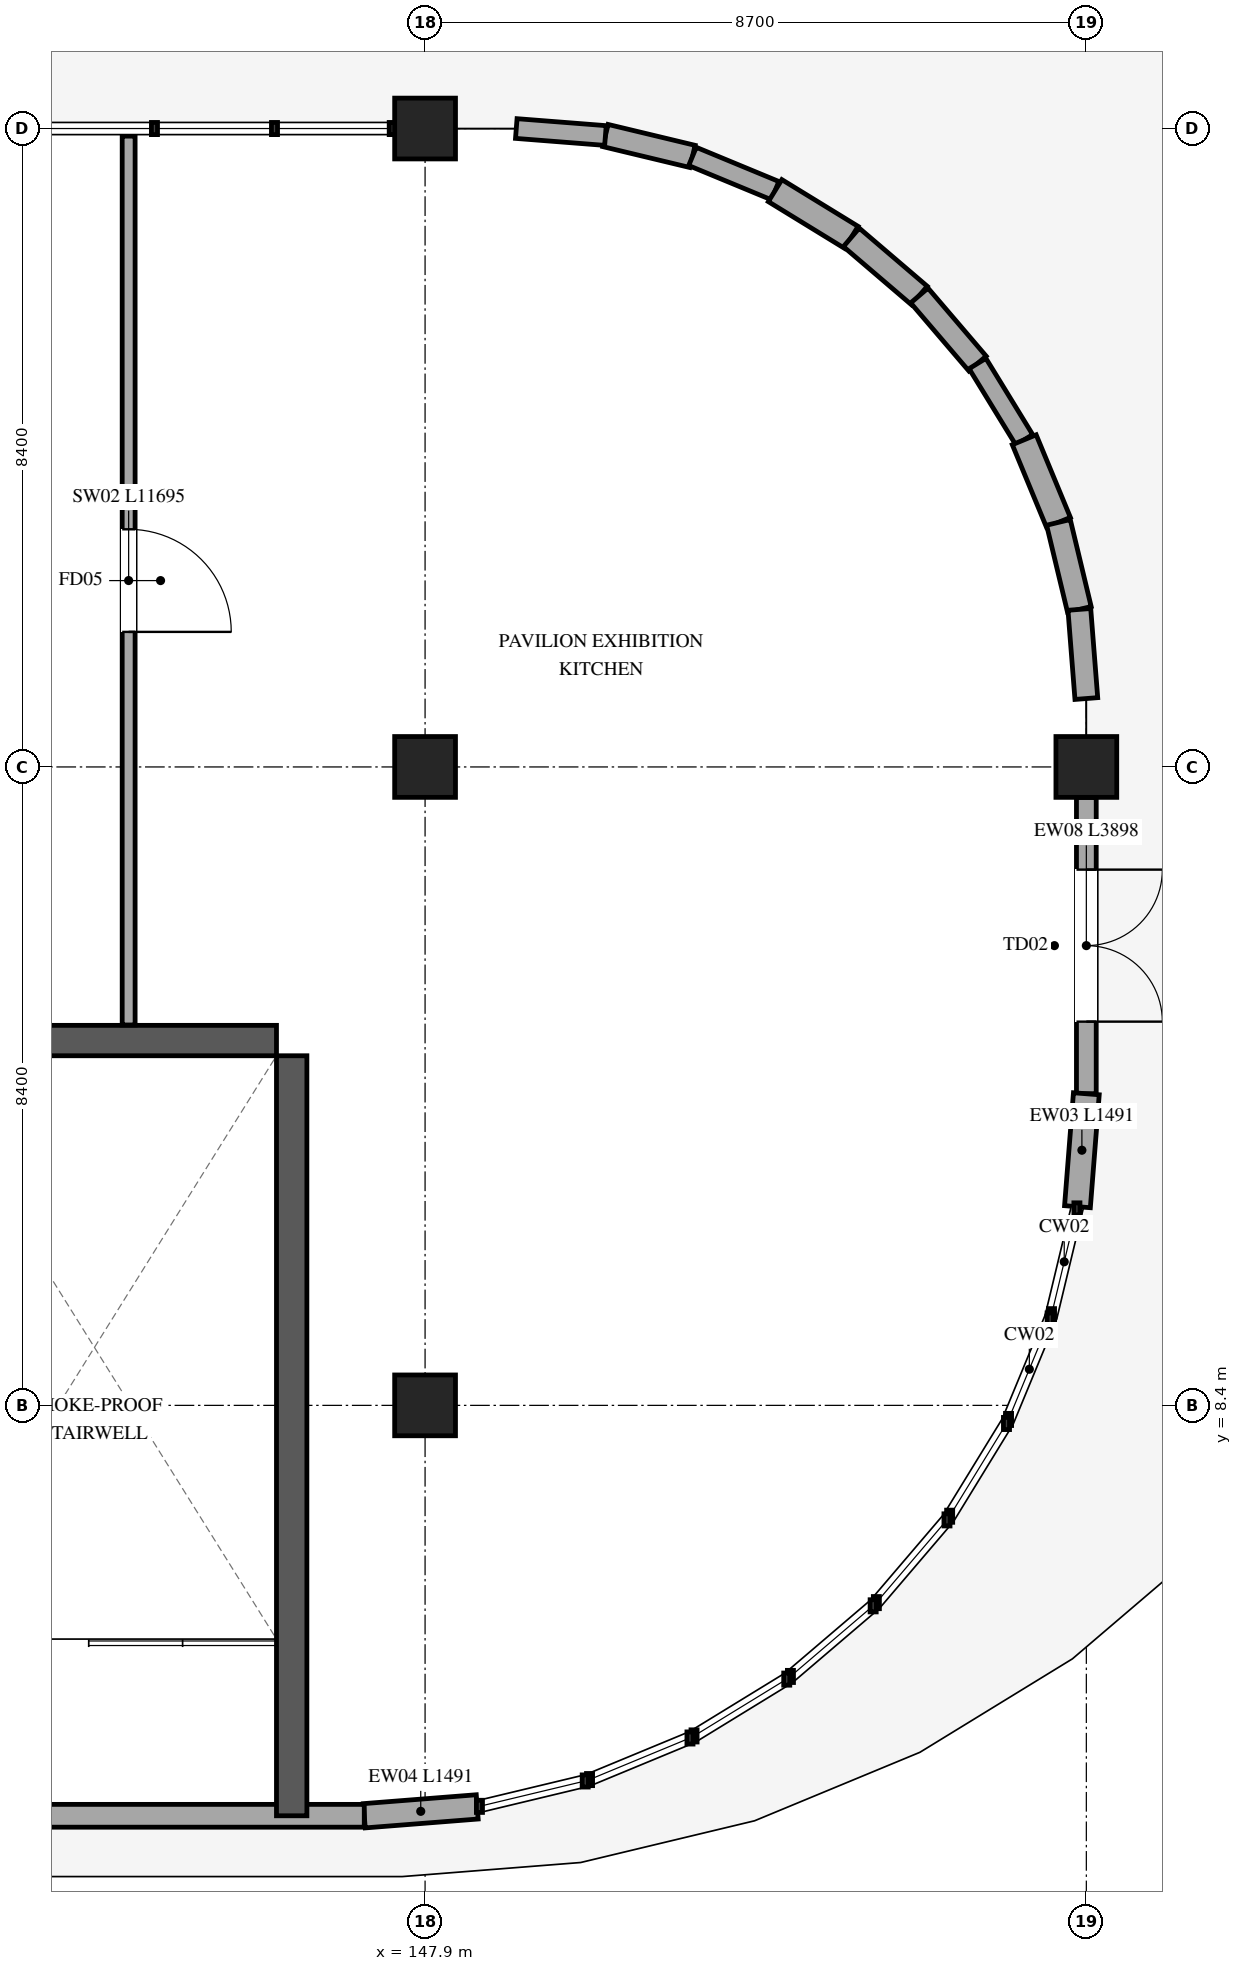
"""IFC4 building model, lengths in metres.
Left out: names, types, materials, properties, quantities, classifications, styles, units other than length and angle.
Written with IfcOpenShell. Run it as: python <this file> out.ifc"""

import sys

from ifc_helpers import new_model, si_unit, direction, frame, frame_2d, origin, origin_2d, place, context, subcontext, project, spatial, rectangle, extrude, element, fill, save


model = new_model("IFC4")
c1 = context("Model", 3, precision=1e-05, world=origin(), true_north=direction((0.0, 1.0)))
c2 = subcontext(c1, "Body", "Model", "MODEL_VIEW")
j1 = project(units=[si_unit("LENGTHUNIT", "METRE"), si_unit("PLANEANGLEUNIT", "RADIAN")], contexts=[c1])
p1 = place(None, origin())
s1 = spatial("IfcSite", under=j1, at=p1, CompositionType="ELEMENT")
p2 = place(p1, origin())
s2 = spatial("IfcBuilding", under=s1, at=p2, CompositionType="ELEMENT")
p3 = place(p2, frame((0.0, 0.0, 21.6)))
s3 = spatial("IfcBuildingStorey", under=s2, at=p3, CompositionType="ELEMENT", Elevation=21.6)
for number, where, z_axis, x_axis in (
    (1, (147.9, 8.4, 0.0), (0.0, 0.0, 1.0), (1.0, 0.0, 0.0)),
    (2, (147.9, 16.8, 0.0), (0.0, 0.0, 1.0), (1.0, 0.0, 0.0)),
    (3, (147.9, 25.2, 0.0), (0.0, 0.0, 1.0), (1.0, 0.0, 0.0)),
    (4, (156.6, 16.8, 0.0), (0.0, 0.0, 1.0), (1.0, 0.0, 0.0)),
):
    element("IfcColumn", number, at=place(p3, frame(where, z_axis=z_axis, x_axis=x_axis)), inside=s3, PredefinedType="COLUMN", context=c2, shape_type="SweptSolid", body=[
        extrude(rectangle(XDim=0.8, YDim=0.8, at=origin_2d()), origin(), (0.0, 0.0, 1.0), 5.1),
    ])
p4 = place(p3, frame((150.273, 25.108, 0.0), z_axis=(0.0, 0.0, 1.0), x_axis=(0.97236847933, -0.233451366253, 0.0)))
e5 = element("IfcWall", 5, at=p4, inside=s3, PredefinedType="STANDARD", context=c2, shape_type="SweptSolid", body=[
    extrude(rectangle(XDim=1.177, YDim=0.3, at=frame_2d((0.589, 0.0))), origin(), (0.0, 0.0, 1.0), 4.79),
])
p5 = place(p3, frame((151.418, 24.833, 0.0), z_axis=(0.0, 0.0, 1.0), x_axis=(0.923958668987, -0.382492324111, 0.0)))
e6 = element("IfcWall", 6, at=p5, inside=s3, PredefinedType="STANDARD", context=c2, shape_type="SweptSolid", body=[
    extrude(rectangle(XDim=1.176, YDim=0.26, at=frame_2d((0.588, 0.0))), origin(), (0.0, 0.0, 1.0), 4.79),
])
p6 = place(p3, frame((152.505, 24.383, 0.0), z_axis=(0.0, 0.0, 1.0), x_axis=(0.852547572286, -0.522649631197, 0.0)))
e7 = element("IfcWall", 7, at=p6, inside=s3, PredefinedType="STANDARD", context=c2, shape_type="SweptSolid", body=[
    extrude(rectangle(XDim=1.177, YDim=0.34, at=frame_2d((0.588, 0.0))), origin(), (0.0, 0.0, 1.0), 4.79),
])
p7 = place(p3, frame((153.508, 23.768, 0.0), z_axis=(0.0, 0.0, 1.0), x_axis=(0.760104826794, -0.649800471133, 0.0)))
e8 = element("IfcWall", 8, at=p7, inside=s3, PredefinedType="STANDARD", context=c2, shape_type="SweptSolid", body=[
    extrude(rectangle(XDim=1.177, YDim=0.32, at=frame_2d((0.589, 0.0))), origin(), (0.0, 0.0, 1.0), 4.79),
])
p8 = place(p3, frame((154.403, 23.003, 0.0), z_axis=(0.0, 0.0, 1.0), x_axis=(0.649680654867, -0.760207239305, 0.0)))
e9 = element("IfcWall", 9, at=p8, inside=s3, PredefinedType="STANDARD", context=c2, shape_type="SweptSolid", body=[
    extrude(rectangle(XDim=1.177, YDim=0.3, at=frame_2d((0.589, 0.0))), origin(), (0.0, 0.0, 1.0), 4.79),
])
p9 = place(p3, frame((155.168, 22.108, 0.0), z_axis=(0.0, 0.0, 1.0), x_axis=(0.522742095508, -0.852490880646, 0.0)))
e10 = element("IfcWall", 10, at=p9, inside=s3, PredefinedType="STANDARD", context=c2, shape_type="SweptSolid", body=[
    extrude(rectangle(XDim=1.177, YDim=0.26, at=frame_2d((0.588, 0.0))), origin(), (0.0, 0.0, 1.0), 4.79),
])
p10 = place(p3, frame((155.783, 21.105, 0.0), z_axis=(0.0, 0.0, 1.0), x_axis=(0.382492324111, -0.923958668987, 0.0)))
e11 = element("IfcWall", 11, at=p10, inside=s3, PredefinedType="STANDARD", context=c2, shape_type="SweptSolid", body=[
    extrude(rectangle(XDim=1.176, YDim=0.34, at=frame_2d((0.588, 0.0))), origin(), (0.0, 0.0, 1.0), 4.79),
])
p11 = place(p3, frame((156.233, 20.018, 0.0), z_axis=(0.0, 0.0, 1.0), x_axis=(0.233647380769, -0.972321398232, 0.0)))
e12 = element("IfcWall", 12, at=p11, inside=s3, PredefinedType="STANDARD", context=c2, shape_type="SweptSolid", body=[
    extrude(rectangle(XDim=1.178, YDim=0.32, at=frame_2d((0.589, 0.0))), origin(), (0.0, 0.0, 1.0), 4.79),
])
p12 = place(p3, frame((156.508, 18.873, 0.0), z_axis=(0.0, 0.0, 1.0), x_axis=(0.078219548677, -0.996936157537, 0.0)))
e13 = element("IfcWall", 13, at=p12, inside=s3, PredefinedType="STANDARD", context=c2, shape_type="SweptSolid", body=[
    extrude(rectangle(XDim=1.177, YDim=0.3, at=frame_2d((0.588, 0.0))), origin(), (0.0, 0.0, 1.0), 4.79),
])
p13 = place(p3, frame((156.6, 16.398, 0.0), z_axis=(0.0, 0.0, 1.0), x_axis=(0.0, -1.0, 0.0)))
e14 = element("IfcWall", 14, at=p13, inside=s3, PredefinedType="STANDARD", context=c2, shape_type="SweptSolid", body=[
    extrude(rectangle(XDim=3.898, YDim=0.26, at=frame_2d((1.949, 0.0))), origin(), (0.0, 0.0, 1.0), 4.79),
])
p14 = place(p13, frame((0.949, 0.0, 0.0)))
e15 = element("IfcOpeningElement", 15, at=p14, cuts=e14, PredefinedType="OPENING", context=c2, shape_type="SweptSolid", body=[
    extrude(rectangle(XDim=2.0, YDim=2.25, at=frame_2d((1.0, 1.125))), frame((0.0, 0.14, 0.0), z_axis=(0.0, -1.0, 0.0), x_axis=(1.0, 0.0, 0.0)), (0.0, 0.0, 1.0), 0.28),
])
p15 = place(p3, frame((156.6, 12.5, 0.0), z_axis=(0.0, 0.0, 1.0), x_axis=(-0.078612537857, -0.996905245694, 0.0)))
e16 = element("IfcWall", 16, at=p15, inside=s3, PredefinedType="STANDARD", context=c2, shape_type="SweptSolid", body=[
    extrude(rectangle(XDim=1.491, YDim=0.34, at=frame_2d((0.745, 0.0))), origin(), (0.0, 0.0, 1.0), 4.79),
])
p16 = place(p3, frame((148.586, 3.117, 0.0), z_axis=(0.0, 0.0, 1.0), x_axis=(-0.996917059385, -0.078462581572, 0.0)))
e17 = element("IfcWall", 17, at=p16, inside=s3, PredefinedType="STANDARD", context=c2, shape_type="SweptSolid", body=[
    extrude(rectangle(XDim=1.49, YDim=0.32, at=frame_2d((0.745, 0.0))), origin(), (0.0, 0.0, 1.0), 4.79),
])
p17 = place(p3, frame((147.1, 3.0, 0.0), z_axis=(0.0, 0.0, 1.0), x_axis=(-1.0, 0.0, 0.0)))
e18 = element("IfcWall", 18, at=p17, inside=s3, PredefinedType="STANDARD", context=c2, shape_type="SweptSolid", body=[
    extrude(rectangle(XDim=8.431, YDim=0.3, at=frame_2d((4.216, 0.0))), origin(), (0.0, 0.0, 1.0), 4.79),
])
p18 = place(p3, frame((149.1, 25.2, 0.0), z_axis=(0.0, 0.0, 1.0), x_axis=(0.996934887725, -0.078235731197, 0.0)))
e19 = element("IfcWall", 19, at=p18, inside=s3, PredefinedType="STANDARD", context=c2, shape_type="SweptSolid", body=[
    extrude(rectangle(XDim=1.177, YDim=0.26, at=frame_2d((0.588, 0.0))), origin(), (0.0, 0.0, 1.0), 4.79),
])
p19 = place(p3, frame((146.145, 13.0, 0.0), z_axis=(0.0, 0.0, 1.0), x_axis=(0.0, -1.0, 0.0)))
e20 = element("IfcWall", 20, at=p19, inside=s3, PredefinedType="SHEAR", context=c2, shape_type="SweptSolid", body=[
    extrude(rectangle(XDim=10.0, YDim=0.4, at=frame_2d((5.0, 0.0))), origin(), (0.0, 0.0, 1.0), 5.1),
])
p20 = place(p3, frame((141.155, 13.2, 0.0), z_axis=(0.0, 0.0, 1.0), x_axis=(1.0, 0.0, 0.0)))
e21 = element("IfcWall", 21, at=p20, inside=s3, PredefinedType="SHEAR", context=c2, shape_type="SweptSolid", body=[
    extrude(rectangle(XDim=4.79, YDim=0.4, at=frame_2d((2.395, 0.0))), origin(), (0.0, 0.0, 1.0), 5.1),
])
p21 = place(p3, frame((144.0, 25.1, 0.0), z_axis=(0.0, 0.0, 1.0), x_axis=(0.0, -1.0, 0.0)))
e22 = element("IfcWall", 22, at=p21, inside=s3, PredefinedType="MOVABLE", context=c2, shape_type="SweptSolid", body=[
    extrude(rectangle(XDim=11.695, YDim=0.17, at=frame_2d((5.848, 0.0))), origin(), (0.0, 0.0, 1.0), 4.06),
])
p22 = place(p21, frame((5.173, 0.0, 0.0)))
e23 = element("IfcOpeningElement", 23, at=p22, cuts=e22, PredefinedType="OPENING", context=c2, shape_type="SweptSolid", body=[
    extrude(rectangle(XDim=1.35, YDim=2.2, at=frame_2d((0.675, 1.1))), frame((0.0, 0.095, 0.0), z_axis=(0.0, -1.0, 0.0), x_axis=(1.0, 0.0, 0.0)), (0.0, 0.0, 1.0), 0.19),
])
p23 = place(p14, origin())
e24 = element("IfcDoor", 24, at=p23, inside=s3, OperationType="DOUBLE_DOOR_SINGLE_SWING", PredefinedType="DOOR", context=c2, shape_type="SweptSolid", body=[
    extrude(rectangle(XDim=2.0, YDim=2.25, at=frame_2d((1.0, 1.125))), frame((0.0, 0.025, 0.0), z_axis=(0.0, -1.0, 0.0), x_axis=(1.0, 0.0, 0.0)), (0.0, 0.0, 1.0), 0.05),
])
fill(e15, e24)
p24 = place(p22, origin())
e25 = element("IfcDoor", 25, at=p24, inside=s3, OperationType="SINGLE_SWING_RIGHT", PredefinedType="DOOR", context=c2, shape_type="SweptSolid", body=[
    extrude(rectangle(XDim=1.35, YDim=2.2, at=frame_2d((0.675, 1.1))), frame((0.0, 0.025, 0.0), z_axis=(0.0, -1.0, 0.0), x_axis=(1.0, 0.0, 0.0)), (0.0, 0.0, 1.0), 0.05),
])
fill(e23, e25)
save(model, sys.argv[1])
